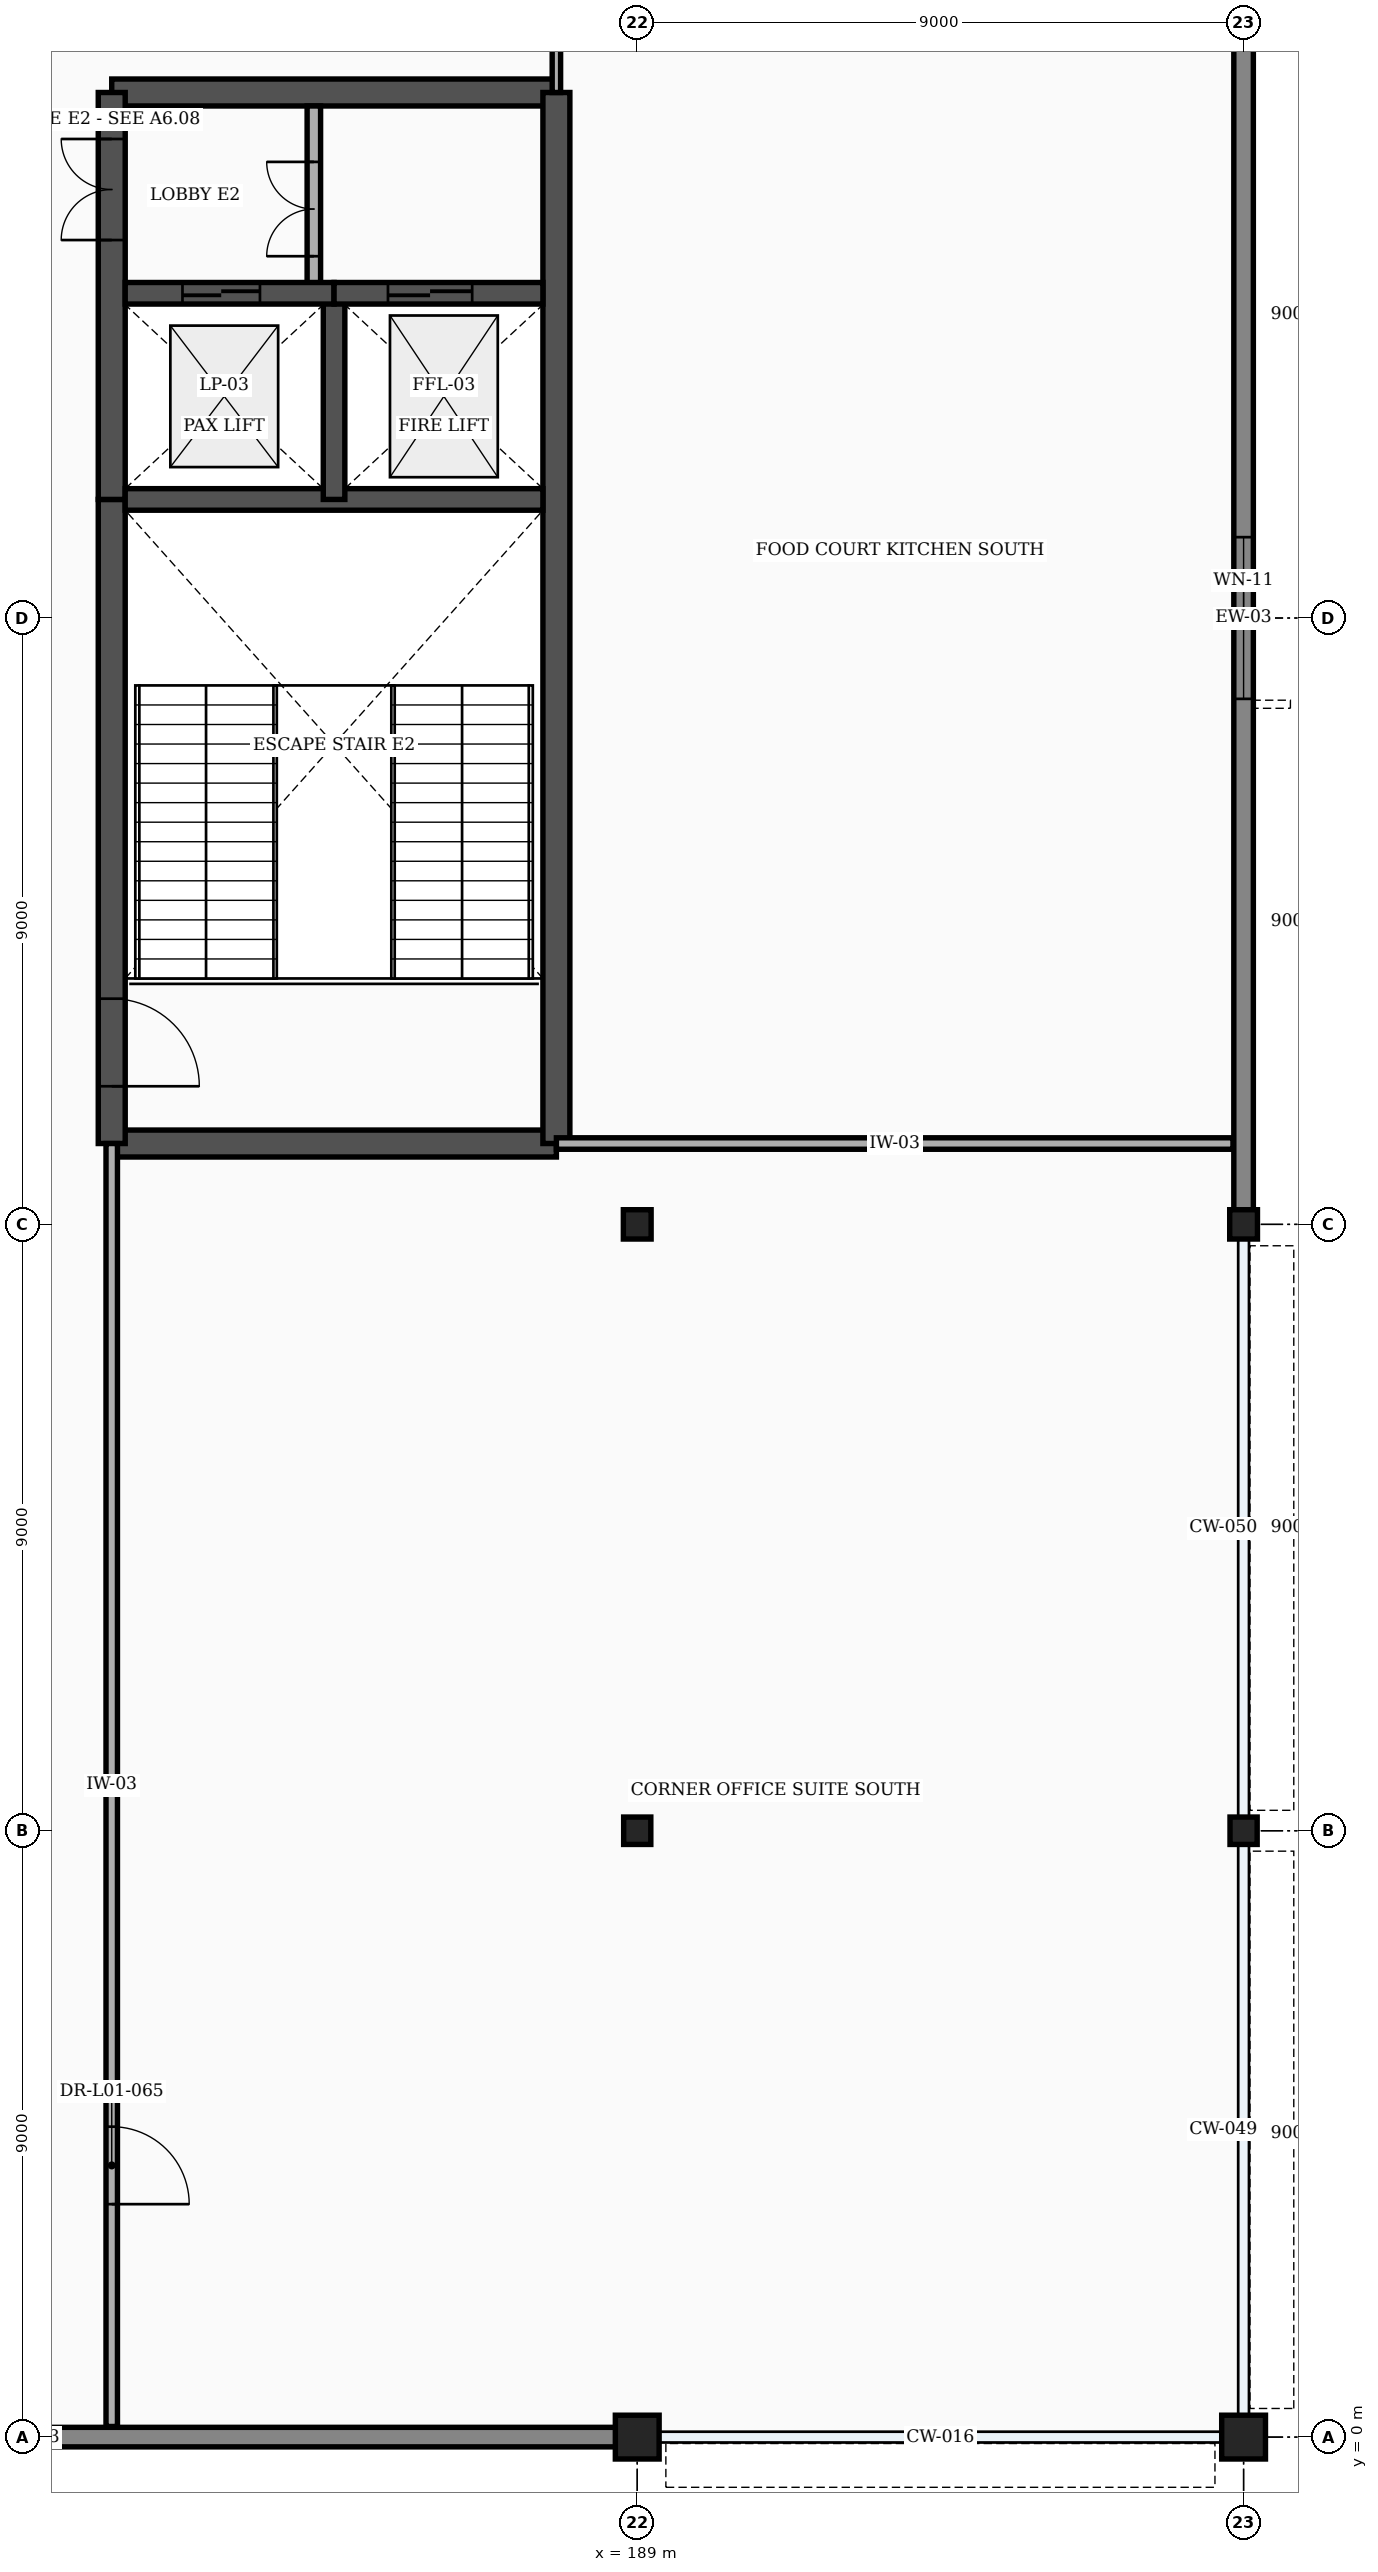
"""IFC4 building model, lengths in metres.
Left out: names, types, materials, properties, quantities, classifications, styles, units other than length and angle.
Written with IfcOpenShell. Run it as: python <this file> out.ifc"""

import sys

from ifc_helpers import new_model, si_unit, direction, frame, frame_2d, origin, origin_2d, place, context, subcontext, project, spatial, rectangle, i_section, extrude, element, fill, save


model = new_model("IFC4")
c1 = context("Model", 3, precision=1e-05, world=origin(), true_north=direction((0.0, 1.0)))
c2 = subcontext(c1, "Body", "Model", "MODEL_VIEW")
j1 = project(units=[si_unit("LENGTHUNIT", "METRE"), si_unit("PLANEANGLEUNIT", "RADIAN")], contexts=[c1])
p1 = place(None, origin())
s1 = spatial("IfcSite", under=j1, at=p1, CompositionType="ELEMENT")
p2 = place(p1, origin())
s2 = spatial("IfcBuilding", under=s1, at=p2, CompositionType="ELEMENT")
p3 = place(p2, frame((0.0, 0.0, 6.0)))
s3 = spatial("IfcBuildingStorey", under=s2, at=p3, CompositionType="ELEMENT", Elevation=6.0)
p4 = place(p3, frame((189.0, 0.0, 0.0), z_axis=(0.0, 0.0, 1.0), x_axis=(1.0, 0.0, 0.0)))
e1 = element("IfcColumn", 1, at=p4, inside=s3, PredefinedType="COLUMN", context=c2, shape_type="SweptSolid", body=[
    extrude(rectangle(XDim=0.65, YDim=0.65, at=origin_2d()), origin(), (0.0, 0.0, 1.0), 5.4),
])
p5 = place(p3, frame((189.0, 9.0, 0.0), z_axis=(0.0, 0.0, 1.0), x_axis=(1.0, 0.0, 0.0)))
e2 = element("IfcColumn", 2, at=p5, inside=s3, PredefinedType="COLUMN", context=c2, shape_type="SweptSolid", body=[
    extrude(i_section(OverallWidth=0.403, OverallDepth=0.406, WebThickness=0.027, FlangeThickness=0.043, at=origin_2d()), origin(), (0.0, 0.0, 1.0), 5.4),
])
p6 = place(p3, frame((189.0, 18.0, 0.0), z_axis=(0.0, 0.0, 1.0), x_axis=(1.0, 0.0, 0.0)))
e3 = element("IfcColumn", 3, at=p6, inside=s3, PredefinedType="COLUMN", context=c2, shape_type="SweptSolid", body=[
    extrude(i_section(OverallWidth=0.412, OverallDepth=0.435, WebThickness=0.036, FlangeThickness=0.058, at=origin_2d()), origin(), (0.0, 0.0, 1.0), 5.4),
])
p7 = place(p3, frame((198.0, 0.0, 0.0), z_axis=(0.0, 0.0, 1.0), x_axis=(1.0, 0.0, 0.0)))
e4 = element("IfcColumn", 4, at=p7, inside=s3, PredefinedType="COLUMN", context=c2, shape_type="SweptSolid", body=[
    extrude(rectangle(XDim=0.65, YDim=0.65, at=origin_2d()), origin(), (0.0, 0.0, 1.0), 5.4),
])
p8 = place(p3, frame((198.0, 9.0, 0.0), z_axis=(0.0, 0.0, 1.0), x_axis=(1.0, 0.0, 0.0)))
e5 = element("IfcColumn", 5, at=p8, inside=s3, PredefinedType="COLUMN", context=c2, shape_type="SweptSolid", body=[
    extrude(i_section(OverallWidth=0.403, OverallDepth=0.406, WebThickness=0.027, FlangeThickness=0.043, at=origin_2d()), origin(), (0.0, 0.0, 1.0), 5.4),
])
p9 = place(p3, frame((198.0, 18.0, 0.0), z_axis=(0.0, 0.0, 1.0), x_axis=(1.0, 0.0, 0.0)))
e6 = element("IfcColumn", 6, at=p9, inside=s3, PredefinedType="COLUMN", context=c2, shape_type="SweptSolid", body=[
    extrude(i_section(OverallWidth=0.412, OverallDepth=0.435, WebThickness=0.036, FlangeThickness=0.058, at=origin_2d()), origin(), (0.0, 0.0, 1.0), 5.4),
])
p10 = place(p3, frame((171.317, 0.0, 0.0), z_axis=(0.0, 0.0, 1.0), x_axis=(1.0, 0.0, 0.0)))
e7 = element("IfcWall", 7, at=p10, inside=s3, PredefinedType="STANDARD", context=c2, shape_type="SweptSolid", body=[
    extrude(rectangle(XDim=17.366, YDim=0.29, at=frame_2d((8.683, 0.0))), origin(), (0.0, 0.0, 1.0), 4.388),
])
p11 = place(p10, frame((0.65, 0.0, 0.85)))
e8 = element("IfcOpeningElement", 8, at=p11, cuts=e7, PredefinedType="OPENING", context=c2, shape_type="SweptSolid", body=[
    extrude(rectangle(XDim=2.4, YDim=2.6, at=frame_2d((1.2, 1.3))), frame((0.0, 0.157, 0.0), z_axis=(0.0, -1.0, 0.0), x_axis=(1.0, 0.0, 0.0)), (0.0, 0.0, 1.0), 0.314),
])
p12 = place(p3, frame((198.0, 18.198, 0.0), z_axis=(0.0, 0.0, 1.0), x_axis=(0.0, 1.0, 0.0)))
e9 = element("IfcWall", 9, at=p12, inside=s3, PredefinedType="STANDARD", context=c2, shape_type="SweptSolid", body=[
    extrude(rectangle(XDim=17.603, YDim=0.29, at=frame_2d((8.802, 0.0))), origin(), (0.0, 0.0, 1.0), 4.467),
])
p13 = place(p12, frame((7.602, 0.0, 0.85)))
e10 = element("IfcOpeningElement", 10, at=p13, cuts=e9, PredefinedType="OPENING", context=c2, shape_type="SweptSolid", body=[
    extrude(rectangle(XDim=2.4, YDim=2.6, at=frame_2d((1.2, 1.3))), frame((0.0, 0.157, 0.0), z_axis=(0.0, -1.0, 0.0), x_axis=(1.0, 0.0, 0.0)), (0.0, 0.0, 1.0), 0.314),
])
for number, where, z_axis, x_axis in (
    (11, (181.2, 19.2, 0.0), (0.0, 0.0, 1.0), (1.0, 0.0, 0.0)),
    (12, (181.2, 34.8, 0.0), (0.0, 0.0, 1.0), (1.0, 0.0, 0.0)),
):
    element("IfcWall", number, at=place(p3, frame(where, z_axis=z_axis, x_axis=x_axis)), inside=s3, PredefinedType="SHEAR", context=c2, shape_type="SweptSolid", body=[
        extrude(rectangle(XDim=6.6, YDim=0.4, at=frame_2d((3.3, 0.0))), origin(), (0.0, 0.0, 1.0), 5.15),
    ])
p14 = place(p3, frame((187.8, 19.2, 0.0), z_axis=(0.0, 0.0, 1.0), x_axis=(0.0, 1.0, 0.0)))
e13 = element("IfcWall", 13, at=p14, inside=s3, PredefinedType="SHEAR", context=c2, shape_type="SweptSolid", body=[
    extrude(rectangle(XDim=15.6, YDim=0.4, at=frame_2d((7.8, 0.0))), origin(), (0.0, 0.0, 1.0), 5.15),
])
p15 = place(p3, frame((181.2, 19.2, 0.0), z_axis=(0.0, 0.0, 1.0), x_axis=(0.0, 1.0, 0.0)))
e14 = element("IfcWall", 14, at=p15, inside=s3, PredefinedType="SHEAR", context=c2, shape_type="SweptSolid", body=[
    extrude(rectangle(XDim=9.56, YDim=0.4, at=frame_2d((4.78, 0.0))), origin(), (0.0, 0.0, 1.0), 5.15),
])
p16 = place(p15, frame((0.85, 0.0, 0.0)))
e15 = element("IfcOpeningElement", 15, at=p16, cuts=e14, PredefinedType="OPENING", context=c2, shape_type="SweptSolid", body=[
    extrude(rectangle(XDim=1.3, YDim=2.2, at=frame_2d((0.65, 1.1))), frame((0.0, 0.212, 0.0), z_axis=(0.0, -1.0, 0.0), x_axis=(1.0, 0.0, 0.0)), (0.0, 0.0, 1.0), 0.424),
])
p17 = place(p3, frame((181.2, 28.76, 0.0), z_axis=(0.0, 0.0, 1.0), x_axis=(0.0, 1.0, 0.0)))
e16 = element("IfcWall", 16, at=p17, inside=s3, PredefinedType="SHEAR", context=c2, shape_type="SweptSolid", body=[
    extrude(rectangle(XDim=6.04, YDim=0.4, at=frame_2d((3.02, 0.0))), origin(), (0.0, 0.0, 1.0), 5.15),
])
p18 = place(p17, frame((3.85, 0.0, 0.0)))
e17 = element("IfcOpeningElement", 17, at=p18, cuts=e16, PredefinedType="OPENING", context=c2, shape_type="SweptSolid", body=[
    extrude(rectangle(XDim=1.5, YDim=2.2, at=frame_2d((0.75, 1.1))), frame((0.0, 0.212, 0.0), z_axis=(0.0, -1.0, 0.0), x_axis=(1.0, 0.0, 0.0)), (0.0, 0.0, 1.0), 0.424),
])
p19 = place(p3, frame((181.4, 28.76, 0.0), z_axis=(0.0, 0.0, 1.0), x_axis=(1.0, 0.0, 0.0)))
e18 = element("IfcWall", 18, at=p19, inside=s3, PredefinedType="SHEAR", context=c2, shape_type="SweptSolid", body=[
    extrude(rectangle(XDim=6.2, YDim=0.32, at=frame_2d((3.1, 0.0))), origin(), (0.0, 0.0, 1.0), 5.15),
])
p20 = place(p3, frame((184.5, 28.76, 0.0), z_axis=(0.0, 0.0, 1.0), x_axis=(0.0, 1.0, 0.0)))
e19 = element("IfcWall", 19, at=p20, inside=s3, PredefinedType="SHEAR", context=c2, shape_type="SweptSolid", body=[
    extrude(rectangle(XDim=3.06, YDim=0.32, at=frame_2d((1.53, 0.0))), origin(), (0.0, 0.0, 1.0), 5.15),
])
p21 = place(p3, frame((184.2, 31.82, 0.0), z_axis=(0.0, 0.0, 1.0), x_axis=(0.0, 1.0, 0.0)))
e20 = element("IfcWall", 20, at=p21, inside=s3, PredefinedType="PARTITIONING", context=c2, shape_type="SweptSolid", body=[
    extrude(rectangle(XDim=2.78, YDim=0.2, at=frame_2d((1.39, 0.0))), origin(), (0.0, 0.0, 1.0), 5.15),
])
p22 = place(p21, frame((0.55, 0.0, 0.0)))
e21 = element("IfcOpeningElement", 21, at=p22, cuts=e20, PredefinedType="OPENING", context=c2, shape_type="SweptSolid", body=[
    extrude(rectangle(XDim=1.4, YDim=2.25, at=frame_2d((0.7, 1.125))), frame((0.0, 0.112, 0.0), z_axis=(0.0, -1.0, 0.0), x_axis=(1.0, 0.0, 0.0)), (0.0, 0.0, 1.0), 0.224),
])
p23 = place(p3, frame((181.4, 31.82, 0.0), z_axis=(0.0, 0.0, 1.0), x_axis=(1.0, 0.0, 0.0)))
e22 = element("IfcWall", 22, at=p23, inside=s3, PredefinedType="SHEAR", context=c2, shape_type="SweptSolid", body=[
    extrude(rectangle(XDim=3.1, YDim=0.32, at=frame_2d((1.55, 0.0))), origin(), (0.0, 0.0, 1.0), 5.15),
])
p24 = place(p23, frame((0.85, 0.0, 0.0)))
e23 = element("IfcOpeningElement", 23, at=p24, cuts=e22, PredefinedType="OPENING", context=c2, shape_type="SweptSolid", body=[
    extrude(rectangle(XDim=1.15, YDim=2.2, at=frame_2d((0.575, 1.1))), frame((0.0, 0.172, 0.0), z_axis=(0.0, -1.0, 0.0), x_axis=(1.0, 0.0, 0.0)), (0.0, 0.0, 1.0), 0.344),
])
p25 = place(p3, frame((184.5, 31.82, 0.0), z_axis=(0.0, 0.0, 1.0), x_axis=(1.0, 0.0, 0.0)))
e24 = element("IfcWall", 24, at=p25, inside=s3, PredefinedType="SHEAR", context=c2, shape_type="SweptSolid", body=[
    extrude(rectangle(XDim=3.1, YDim=0.32, at=frame_2d((1.55, 0.0))), origin(), (0.0, 0.0, 1.0), 5.15),
])
p26 = place(p25, frame((0.8, 0.0, 0.0)))
e25 = element("IfcOpeningElement", 25, at=p26, cuts=e24, PredefinedType="OPENING", context=c2, shape_type="SweptSolid", body=[
    extrude(rectangle(XDim=1.25, YDim=2.25, at=frame_2d((0.625, 1.125))), frame((0.0, 0.172, 0.0), z_axis=(0.0, -1.0, 0.0), x_axis=(1.0, 0.0, 0.0)), (0.0, 0.0, 1.0), 0.344),
])
p27 = place(p3, frame((187.8, 34.8, 0.0), z_axis=(0.0, 0.0, 1.0), x_axis=(0.0, 1.0, 0.0)))
e26 = element("IfcWall", 26, at=p27, inside=s3, PredefinedType="PARTITIONING", context=c2, shape_type="SweptSolid", body=[
    extrude(rectangle(XDim=2.0, YDim=0.125, at=frame_2d((1.0, 0.0))), origin(), (0.0, 0.0, 1.0), 5.15),
])
p28 = place(p3, frame((187.8, 19.2, 0.0), z_axis=(0.0, 0.0, 1.0), x_axis=(1.0, 0.0, 0.0)))
e27 = element("IfcWall", 27, at=p28, inside=s3, PredefinedType="PARTITIONING", context=c2, shape_type="SweptSolid", body=[
    extrude(rectangle(XDim=10.042, YDim=0.17, at=frame_2d((5.021, 0.0))), origin(), (0.0, 0.0, 1.0), 5.15),
])
p29 = place(p3, frame((181.2, 0.157, 0.0), z_axis=(0.0, 0.0, 1.0), x_axis=(0.0, 1.0, 0.0)))
e28 = element("IfcWall", 28, at=p29, inside=s3, PredefinedType="PARTITIONING", context=c2, shape_type="SweptSolid", body=[
    extrude(rectangle(XDim=19.042, YDim=0.17, at=frame_2d((9.521, 0.0))), origin(), (0.0, 0.0, 1.0), 5.15),
])
p30 = place(p29, frame((3.3, 0.0, 0.0)))
e29 = element("IfcOpeningElement", 29, at=p30, cuts=e28, PredefinedType="OPENING", context=c2, shape_type="SweptSolid", body=[
    extrude(rectangle(XDim=1.15, YDim=2.15, at=frame_2d((0.575, 1.075))), frame((0.0, 0.097, 0.0), z_axis=(0.0, -1.0, 0.0), x_axis=(1.0, 0.0, 0.0)), (0.0, 0.0, 1.0), 0.194),
])
p31 = place(p13, origin())
e30 = element("IfcWindow", 30, at=p31, inside=s3, PartitioningType="SINGLE_PANEL", PredefinedType="WINDOW", context=c2, shape_type="SweptSolid", body=[
    extrude(rectangle(XDim=2.4, YDim=2.6, at=frame_2d((1.2, 1.3))), frame((0.0, 0.03, 0.0), z_axis=(0.0, -1.0, 0.0), x_axis=(1.0, 0.0, 0.0)), (0.0, 0.0, 1.0), 0.06),
])
fill(e10, e30)
p32 = place(p16, frame((1.3, 0.0, 0.0), z_axis=(0.0, 0.0, 1.0), x_axis=(-1.0, 0.0, 0.0)))
e31 = element("IfcDoor", 31, at=p32, inside=s3, OperationType="SINGLE_SWING_RIGHT", PredefinedType="DOOR", context=c2, shape_type="SweptSolid", body=[
    extrude(rectangle(XDim=1.3, YDim=2.2, at=frame_2d((0.65, 1.1))), frame((0.0, 0.025, 0.0), z_axis=(0.0, -1.0, 0.0), x_axis=(1.0, 0.0, 0.0)), (0.0, 0.0, 1.0), 0.05),
])
fill(e15, e31)
p33 = place(p18, origin())
e32 = element("IfcDoor", 32, at=p33, inside=s3, OperationType="DOUBLE_DOOR_SINGLE_SWING", PredefinedType="DOOR", context=c2, shape_type="SweptSolid", body=[
    extrude(rectangle(XDim=1.5, YDim=2.2, at=frame_2d((0.75, 1.1))), frame((0.0, 0.025, 0.0), z_axis=(0.0, -1.0, 0.0), x_axis=(1.0, 0.0, 0.0)), (0.0, 0.0, 1.0), 0.05),
])
fill(e17, e32)
p34 = place(p22, origin())
e33 = element("IfcDoor", 33, at=p34, inside=s3, OperationType="DOUBLE_DOOR_SINGLE_SWING", PredefinedType="DOOR", context=c2, shape_type="SweptSolid", body=[
    extrude(rectangle(XDim=1.4, YDim=2.25, at=frame_2d((0.7, 1.125))), frame((0.0, 0.025, 0.0), z_axis=(0.0, -1.0, 0.0), x_axis=(1.0, 0.0, 0.0)), (0.0, 0.0, 1.0), 0.05),
])
fill(e21, e33)
p35 = place(p24, origin())
e34 = element("IfcDoor", 34, at=p35, inside=s3, OperationType="DOUBLE_DOOR_SLIDING", PredefinedType="DOOR", context=c2, shape_type="SweptSolid", body=[
    extrude(rectangle(XDim=1.15, YDim=2.2, at=frame_2d((0.575, 1.1))), frame((0.0, 0.025, 0.0), z_axis=(0.0, -1.0, 0.0), x_axis=(1.0, 0.0, 0.0)), (0.0, 0.0, 1.0), 0.05),
])
fill(e23, e34)
p36 = place(p26, origin())
e35 = element("IfcDoor", 35, at=p36, inside=s3, OperationType="DOUBLE_DOOR_SLIDING", PredefinedType="DOOR", context=c2, shape_type="SweptSolid", body=[
    extrude(rectangle(XDim=1.25, YDim=2.25, at=frame_2d((0.625, 1.125))), frame((0.0, 0.025, 0.0), z_axis=(0.0, -1.0, 0.0), x_axis=(1.0, 0.0, 0.0)), (0.0, 0.0, 1.0), 0.05),
])
fill(e25, e35)
p37 = place(p30, frame((1.15, 0.0, 0.0), z_axis=(0.0, 0.0, 1.0), x_axis=(-1.0, 0.0, 0.0)))
e36 = element("IfcDoor", 36, at=p37, inside=s3, OperationType="SINGLE_SWING_RIGHT", PredefinedType="DOOR", context=c2, shape_type="SweptSolid", body=[
    extrude(rectangle(XDim=1.15, YDim=2.15, at=frame_2d((0.575, 1.075))), frame((0.0, 0.025, 0.0), z_axis=(0.0, -1.0, 0.0), x_axis=(1.0, 0.0, 0.0)), (0.0, 0.0, 1.0), 0.05),
])
fill(e29, e36)
save(model, sys.argv[1])
